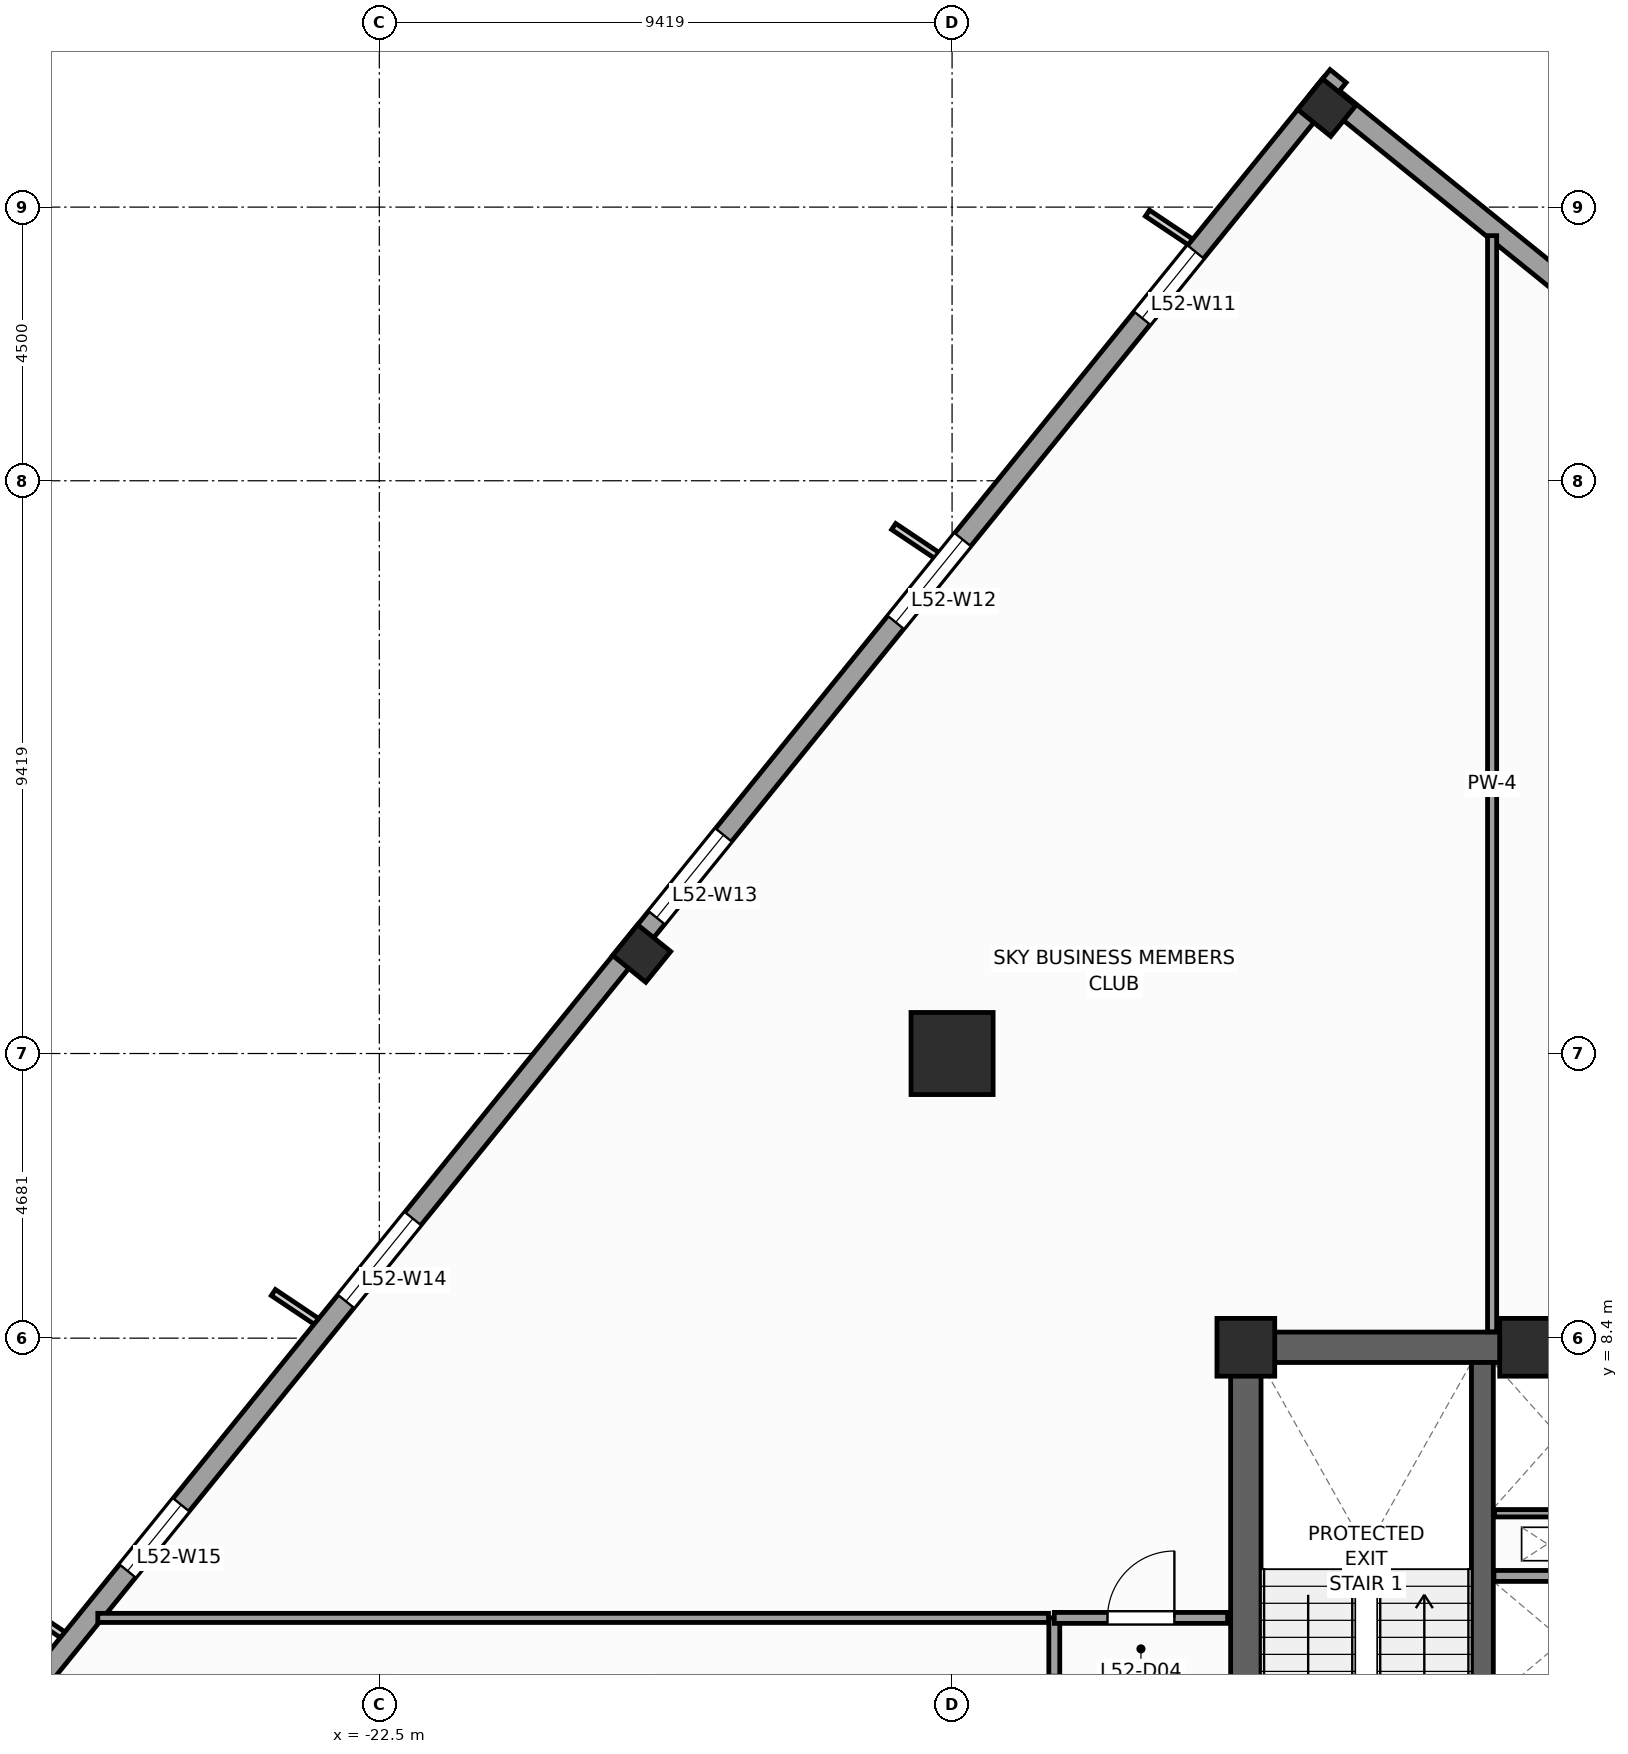
"""IFC4 building model, lengths in metres.
Left out: names, types, materials, properties, quantities, classifications, styles, units other than length and angle.
Written with IfcOpenShell. Run it as: python <this file> out.ifc"""

import sys

from ifc_helpers import new_model, si_unit, direction, frame, frame_2d, origin, origin_2d, place, context, subcontext, project, spatial, rectangle, extrude, source, transform, mapped, element, fill, save


model = new_model("IFC4")
c1 = context("Model", 3, precision=1e-05, world=origin(), true_north=direction((0.0, 1.0)))
c2 = subcontext(c1, "Body", "Model", "MODEL_VIEW")
j1 = project(units=[si_unit("LENGTHUNIT", "METRE"), si_unit("PLANEANGLEUNIT", "RADIAN")], contexts=[c1])
p1 = place(None, origin())
s1 = spatial("IfcSite", under=j1, at=p1, CompositionType="ELEMENT")
p2 = place(p1, origin())
s2 = spatial("IfcBuilding", under=s1, at=p2, CompositionType="ELEMENT")
p3 = place(p2, frame((0.0, 0.0, 217.3)))
s3 = spatial("IfcBuildingStorey", under=s2, at=p3, CompositionType="ELEMENT", Elevation=217.3)
p4 = place(p3, frame((-8.5, 8.25, 0.0), z_axis=(0.0, 0.0, 1.0), x_axis=(1.0, 0.0, 0.0)))
e1 = element("IfcWall", 1, at=p4, inside=s3, PredefinedType="SHEAR", context=c2, shape_type="SweptSolid", body=[
    extrude(rectangle(XDim=17.0, YDim=0.5, at=frame_2d((8.5, 0.0))), origin(), (0.0, 0.0, 1.0), 3.9),
])
p5 = place(p3, frame((-8.25, -8.0, 0.0), z_axis=(0.0, 0.0, 1.0), x_axis=(0.0, 1.0, 0.0)))
e2 = element("IfcWall", 2, at=p5, inside=s3, PredefinedType="SHEAR", context=c2, shape_type="SweptSolid", body=[
    extrude(rectangle(XDim=16.0, YDim=0.5, at=frame_2d((8.0, 0.0))), origin(), (0.0, 0.0, 1.0), 3.9),
])
p6 = place(p5, frame((4.69, 0.0, 0.0)))
e3 = element("IfcOpeningElement", 3, at=p6, cuts=e2, PredefinedType="OPENING", context=c2, shape_type="SweptSolid", body=[
    extrude(rectangle(XDim=1.3, YDim=2.2, at=frame_2d((0.65, 1.1))), frame((0.0, 0.26, 0.0), z_axis=(0.0, -1.0, 0.0), x_axis=(1.0, 0.0, 0.0)), (0.0, 0.0, 1.0), 0.52),
])
p7 = place(p3, frame((-4.36, -8.0, 0.0), z_axis=(0.0, 0.0, 1.0), x_axis=(0.0, 1.0, 0.0)))
e4 = element("IfcWall", 4, at=p7, inside=s3, PredefinedType="SHEAR", context=c2, shape_type="SweptSolid", body=[
    extrude(rectangle(XDim=16.0, YDim=0.36, at=frame_2d((8.0, 0.0))), origin(), (0.0, 0.0, 1.0), 3.9),
])
m1 = source(origin(), c2, "Body", "SweptSolid", [
    extrude(rectangle(XDim=0.95, YDim=0.95, at=origin_2d()), origin(), (0.0, 0.0, 1.0), 3.9),
])
for number, where, z_axis, x_axis in (
    (5, (-8.25, 8.25, 0.0), (0.0, 0.0, 1.0), (1.0, 0.0, 0.0)),
    (6, (-3.6, 8.25, 0.0), (0.0, 0.0, 1.0), (1.0, 0.0, 0.0)),
):
    element("IfcColumn", number, at=place(p3, frame(where, z_axis=z_axis, x_axis=x_axis)), inside=s3, PredefinedType="PILASTER", context=c2, shape_type="MappedRepresentation", body=[
        mapped(m1, transform((0.0, 0.0, 0.0), scale=1.0)),
    ])
m2 = source(origin(), c2, "Body", "SweptSolid", [
    extrude(rectangle(XDim=1.35, YDim=1.35, at=origin_2d()), origin(), (0.0, 0.0, 1.0), 3.9),
])
p8 = place(p3, frame((-13.081, 13.081, 0.0), z_axis=(0.0, 0.0, 1.0), x_axis=(1.0, 0.0, 0.0)))
e7 = element("IfcColumn", 7, at=p8, inside=s3, PredefinedType="COLUMN", context=c2, shape_type="MappedRepresentation", body=[
    mapped(m2, transform((0.0, 0.0, 0.0), scale=1.0)),
])
m3 = source(origin(), c2, "Body", "SweptSolid", [
    extrude(rectangle(XDim=0.65, YDim=0.7, at=origin_2d()), origin(), (0.0, 0.0, 1.0), 3.9),
])
for number, where, z_axis, x_axis in (
    (8, (-6.92, 28.637, 0.0), (0.0, 0.0, 1.0), (0.629, 0.777, 0.0)),
    (9, (-18.185, 14.726, 0.0), (0.0, 0.0, 1.0), (0.629, 0.777, 0.0)),
):
    element("IfcColumn", number, at=place(p3, frame(where, z_axis=z_axis, x_axis=x_axis)), inside=s3, PredefinedType="COLUMN", context=c2, shape_type="MappedRepresentation", body=[
        mapped(m3, transform((0.0, 0.0, 0.0), scale=1.0)),
    ])
p9 = place(p3, frame((-2.673, 25.429, 0.0), z_axis=(0.0, 0.0, 1.0), x_axis=(-0.777162640055, 0.629299794138, 0.0)))
e10 = element("IfcWall", 10, at=p9, inside=s3, PredefinedType="STANDARD", context=c2, shape_type="SweptSolid", body=[
    extrude(rectangle(XDim=5.67, YDim=0.34, at=frame_2d((2.835, 0.0))), origin(), (0.0, 0.0, 1.0), 3.66),
])
p10 = place(p3, frame((-6.733, 29.154, 0.0), z_axis=(0.0, 0.0, 1.0), x_axis=(-0.629325378072, -0.77714192302, 0.0)))
e11 = element("IfcWall", 11, at=p10, inside=s3, PredefinedType="STANDARD", context=c2, shape_type="SweptSolid", body=[
    extrude(rectangle(XDim=36.84, YDim=0.34, at=frame_2d((18.42, 0.0))), origin(), (0.0, 0.0, 1.0), 2.96),
])
p11 = place(p10, frame((3.721, 0.0, 0.48)))
e12 = element("IfcOpeningElement", 12, at=p11, cuts=e11, PredefinedType="OPENING", context=c2, shape_type="SweptSolid", body=[
    extrude(rectangle(XDim=1.4, YDim=2.4, at=frame_2d((0.7, 1.2))), frame((0.0, 0.18, 0.0), z_axis=(0.0, -1.0, 0.0), x_axis=(1.0, 0.0, 0.0)), (0.0, 0.0, 1.0), 0.36),
])
p12 = place(p10, frame((9.809, 0.0, 0.58)))
e13 = element("IfcOpeningElement", 13, at=p12, cuts=e11, PredefinedType="OPENING", context=c2, shape_type="SweptSolid", body=[
    extrude(rectangle(XDim=1.75, YDim=2.3, at=frame_2d((0.875, 1.15))), frame((0.0, 0.18, 0.0), z_axis=(0.0, -1.0, 0.0), x_axis=(1.0, 0.0, 0.0)), (0.0, 0.0, 1.0), 0.36),
])
p13 = place(p10, frame((16.058, 0.0, 0.58)))
e14 = element("IfcOpeningElement", 14, at=p13, cuts=e11, PredefinedType="OPENING", context=c2, shape_type="SweptSolid", body=[
    extrude(rectangle(XDim=1.75, YDim=2.3, at=frame_2d((0.875, 1.15))), frame((0.0, 0.18, 0.0), z_axis=(0.0, -1.0, 0.0), x_axis=(1.0, 0.0, 0.0)), (0.0, 0.0, 1.0), 0.36),
])
p14 = place(p10, frame((24.176, 0.0, 0.58)))
e15 = element("IfcOpeningElement", 15, at=p14, cuts=e11, PredefinedType="OPENING", context=c2, shape_type="SweptSolid", body=[
    extrude(rectangle(XDim=1.75, YDim=2.3, at=frame_2d((0.875, 1.15))), frame((0.0, 0.18, 0.0), z_axis=(0.0, -1.0, 0.0), x_axis=(1.0, 0.0, 0.0)), (0.0, 0.0, 1.0), 0.36),
])
p15 = place(p10, frame((30.232, 0.0, 0.48)))
e16 = element("IfcOpeningElement", 16, at=p15, cuts=e11, PredefinedType="OPENING", context=c2, shape_type="SweptSolid", body=[
    extrude(rectangle(XDim=1.4, YDim=2.4, at=frame_2d((0.7, 1.2))), frame((0.0, 0.18, 0.0), z_axis=(0.0, -1.0, 0.0), x_axis=(1.0, 0.0, 0.0)), (0.0, 0.0, 1.0), 0.36),
])
p16 = place(p3, frame((-4.17, 4.49, 0.0), z_axis=(0.0, 0.0, 1.0), x_axis=(1.0, 0.0, 0.0)))
e17 = element("IfcWall", 17, at=p16, inside=s3, PredefinedType="PARTITIONING", context=c2, shape_type="SweptSolid", body=[
    extrude(rectangle(XDim=2.28, YDim=0.18, at=frame_2d((1.14, 0.0))), origin(), (0.0, 0.0, 1.0), 3.66),
])
p17 = place(p3, frame((-4.16, 5.52, 0.0), z_axis=(0.0, 0.0, 1.0), x_axis=(1.0, 0.0, 0.0)))
e18 = element("IfcWall", 18, at=p17, inside=s3, PredefinedType="PARTITIONING", context=c2, shape_type="SweptSolid", body=[
    extrude(rectangle(XDim=2.1, YDim=0.12, at=frame_2d((1.05, 0.0))), origin(), (0.0, 0.0, 1.0), 3.66),
])
p18 = place(p3, frame((-11.4, -10.2, 0.0), z_axis=(0.0, 0.0, 1.0), x_axis=(0.0, 1.0, 0.0)))
e19 = element("IfcWall", 19, at=p18, inside=s3, PredefinedType="PARTITIONING", context=c2, shape_type="SweptSolid", body=[
    extrude(rectangle(XDim=14.0, YDim=0.18, at=frame_2d((7.0, 0.0))), origin(), (0.0, 0.0, 1.0), 3.66),
])
p19 = place(p18, frame((11.96, 0.0, 0.0)))
e20 = element("IfcOpeningElement", 20, at=p19, cuts=e19, PredefinedType="OPENING", context=c2, shape_type="SweptSolid", body=[
    extrude(rectangle(XDim=1.1, YDim=2.2, at=frame_2d((0.55, 1.1))), frame((0.0, 0.1, 0.0), z_axis=(0.0, -1.0, 0.0), x_axis=(1.0, 0.0, 0.0)), (0.0, 0.0, 1.0), 0.2),
])
p20 = place(p18, frame((9.025, 0.0, 0.0)))
e21 = element("IfcOpeningElement", 21, at=p20, cuts=e19, PredefinedType="OPENING", context=c2, shape_type="SweptSolid", body=[
    extrude(rectangle(XDim=1.1, YDim=2.2, at=frame_2d((0.55, 1.1))), frame((0.0, 0.1, 0.0), z_axis=(0.0, -1.0, 0.0), x_axis=(1.0, 0.0, 0.0)), (0.0, 0.0, 1.0), 0.2),
])
p21 = place(p18, frame((4.35, 0.0, 0.0)))
e22 = element("IfcOpeningElement", 22, at=p21, cuts=e19, PredefinedType="OPENING", context=c2, shape_type="SweptSolid", body=[
    extrude(rectangle(XDim=1.1, YDim=2.2, at=frame_2d((0.55, 1.1))), frame((0.0, 0.1, 0.0), z_axis=(0.0, -1.0, 0.0), x_axis=(1.0, 0.0, 0.0)), (0.0, 0.0, 1.0), 0.2),
])
p22 = place(p3, frame((-11.4, 3.8, 0.0), z_axis=(0.0, 0.0, 1.0), x_axis=(1.0, 0.0, 0.0)))
e23 = element("IfcWall", 23, at=p22, inside=s3, PredefinedType="PARTITIONING", context=c2, shape_type="SweptSolid", body=[
    extrude(rectangle(XDim=2.85, YDim=0.18, at=frame_2d((1.425, 0.0))), origin(), (0.0, 0.0, 1.0), 3.66),
])
p23 = place(p22, frame((0.875, 0.0, 0.0)))
e24 = element("IfcOpeningElement", 24, at=p23, cuts=e23, PredefinedType="OPENING", context=c2, shape_type="SweptSolid", body=[
    extrude(rectangle(XDim=1.1, YDim=2.2, at=frame_2d((0.55, 1.1))), frame((0.0, 0.1, 0.0), z_axis=(0.0, -1.0, 0.0), x_axis=(1.0, 0.0, 0.0)), (0.0, 0.0, 1.0), 0.2),
])
p24 = place(p3, frame((-4.2, 8.505, 0.0), z_axis=(0.0, 0.0, 1.0), x_axis=(0.0, 1.0, 0.0)))
e25 = element("IfcWall", 25, at=p24, inside=s3, PredefinedType="PARTITIONING", context=c2, shape_type="SweptSolid", body=[
    extrude(rectangle(XDim=18.026, YDim=0.15, at=frame_2d((9.013, 0.0))), origin(), (0.0, 0.0, 1.0), 3.66),
])
p25 = place(p3, frame((-27.129, 3.8, 0.0), z_axis=(0.0, 0.0, 1.0), x_axis=(1.0, 0.0, 0.0)))
e26 = element("IfcWall", 26, at=p25, inside=s3, PredefinedType="PARTITIONING", context=c2, shape_type="SweptSolid", body=[
    extrude(rectangle(XDim=15.634, YDim=0.15, at=frame_2d((7.817, 0.0))), origin(), (0.0, 0.0, 1.0), 3.66),
])
m4 = source(origin(), c2, "Body", "SweptSolid", [
    extrude(rectangle(XDim=1.4, YDim=2.4, at=frame_2d((0.7, 1.2))), frame((0.0, 0.03, 0.0), z_axis=(0.0, -1.0, 0.0), x_axis=(1.0, 0.0, 0.0)), (0.0, 0.0, 1.0), 0.06),
])
p26 = place(p11, origin())
e27 = element("IfcWindow", 27, at=p26, inside=s3, PartitioningType="SINGLE_PANEL", PredefinedType="WINDOW", context=c2, shape_type="MappedRepresentation", body=[
    mapped(m4, transform((0.0, 0.0, 0.0), scale=1.0)),
])
fill(e12, e27)
m5 = source(origin(), c2, "Body", "SweptSolid", [
    extrude(rectangle(XDim=1.75, YDim=2.3, at=frame_2d((0.875, 1.15))), frame((0.0, 0.03, 0.0), z_axis=(0.0, -1.0, 0.0), x_axis=(1.0, 0.0, 0.0)), (0.0, 0.0, 1.0), 0.06),
])
p27 = place(p12, origin())
e28 = element("IfcWindow", 28, at=p27, inside=s3, PartitioningType="SINGLE_PANEL", PredefinedType="WINDOW", context=c2, shape_type="MappedRepresentation", body=[
    mapped(m5, transform((0.0, 0.0, 0.0), scale=1.0)),
])
fill(e13, e28)
p28 = place(p13, origin())
e29 = element("IfcWindow", 29, at=p28, inside=s3, PartitioningType="SINGLE_PANEL", PredefinedType="WINDOW", context=c2, shape_type="MappedRepresentation", body=[
    mapped(m5, transform((0.0, 0.0, 0.0), scale=1.0)),
])
fill(e14, e29)
p29 = place(p14, origin())
e30 = element("IfcWindow", 30, at=p29, inside=s3, PartitioningType="SINGLE_PANEL", PredefinedType="WINDOW", context=c2, shape_type="MappedRepresentation", body=[
    mapped(m5, transform((0.0, 0.0, 0.0), scale=1.0)),
])
fill(e15, e30)
p30 = place(p15, origin())
e31 = element("IfcWindow", 31, at=p30, inside=s3, PartitioningType="SINGLE_PANEL", PredefinedType="WINDOW", context=c2, shape_type="MappedRepresentation", body=[
    mapped(m4, transform((0.0, 0.0, 0.0), scale=1.0)),
])
fill(e16, e31)
m6 = source(origin(), c2, "Body", "SweptSolid", [
    extrude(rectangle(XDim=1.1, YDim=2.2, at=frame_2d((0.55, 1.1))), frame((0.0, 0.025, 0.0), z_axis=(0.0, -1.0, 0.0), x_axis=(1.0, 0.0, 0.0)), (0.0, 0.0, 1.0), 0.05),
])
p31 = place(p23, origin())
e32 = element("IfcDoor", 32, at=p31, inside=s3, OperationType="SINGLE_SWING_RIGHT", PredefinedType="DOOR", context=c2, shape_type="MappedRepresentation", body=[
    mapped(m6, transform((0.0, 0.0, 0.0), scale=1.0)),
])
fill(e24, e32)
save(model, sys.argv[1])
